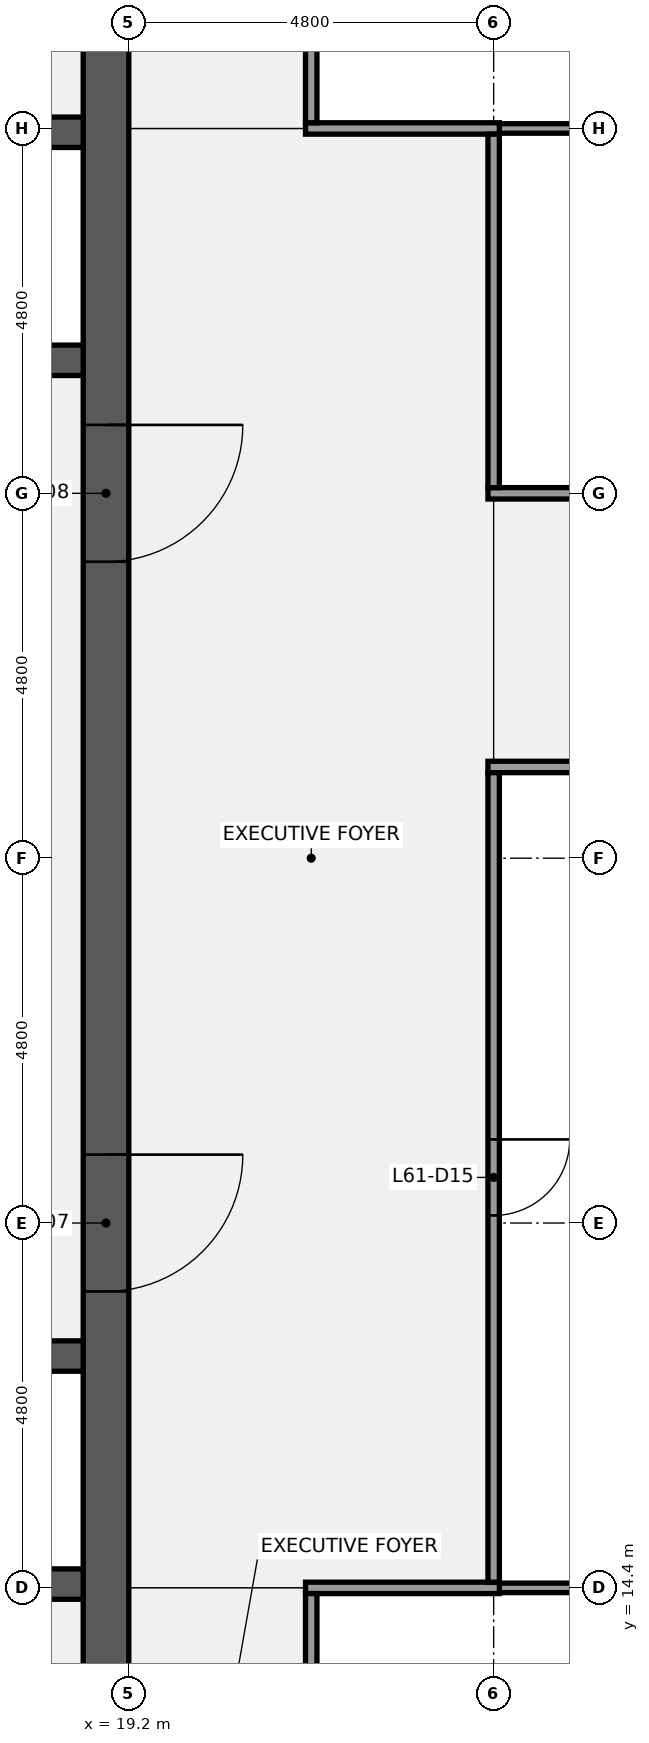
"""IFC4 building model, lengths in metres.
Left out: names, types, materials, properties, quantities, classifications, styles, units other than length and angle.
Written with IfcOpenShell. Run it as: python <this file> out.ifc"""

import sys

from ifc_helpers import new_model, si_unit, direction, frame, frame_2d, origin, place, context, subcontext, project, spatial, rectangle, extrude, element, fill, save


model = new_model("IFC4")
c1 = context("Model", 3, precision=1e-05, world=origin(), true_north=direction((0.0, 1.0)))
c2 = subcontext(c1, "Body", "Model", "MODEL_VIEW")
j1 = project(units=[si_unit("LENGTHUNIT", "METRE"), si_unit("PLANEANGLEUNIT", "RADIAN")], contexts=[c1])
p1 = place(None, origin())
s1 = spatial("IfcSite", under=j1, at=p1, CompositionType="ELEMENT")
p2 = place(p1, origin())
s2 = spatial("IfcBuilding", under=s1, at=p2, CompositionType="ELEMENT")
p3 = place(p2, frame((0.0, 0.0, 282.3)))
s3 = spatial("IfcBuildingStorey", under=s2, at=p3, CompositionType="ELEMENT", Elevation=282.3)
p4 = place(p3, frame((18.9, 38.4, 0.0), z_axis=(0.0, 0.0, 1.0), x_axis=(0.0, -1.0, 0.0)))
e1 = element("IfcWall", 1, at=p4, inside=s3, PredefinedType="SHEAR", context=c2, shape_type="SweptSolid", body=[
    extrude(rectangle(XDim=28.8, YDim=0.6, at=frame_2d((14.4, 0.0))), origin(), (0.0, 0.0, 1.0), 3.84),
])
p5 = place(p4, frame((18.3, 0.0, 0.0)))
e2 = element("IfcOpeningElement", 2, at=p5, cuts=e1, PredefinedType="OPENING", context=c2, shape_type="SweptSolid", body=[
    extrude(rectangle(XDim=1.8, YDim=2.1, at=frame_2d((0.9, 1.05))), frame((0.0, 0.31, 0.0), z_axis=(0.0, -1.0, 0.0), x_axis=(1.0, 0.0, 0.0)), (0.0, 0.0, 1.0), 0.62),
])
p6 = place(p4, frame((8.7, 0.0, 0.0)))
e3 = element("IfcOpeningElement", 3, at=p6, cuts=e1, PredefinedType="OPENING", context=c2, shape_type="SweptSolid", body=[
    extrude(rectangle(XDim=1.8, YDim=2.1, at=frame_2d((0.9, 1.05))), frame((0.0, 0.31, 0.0), z_axis=(0.0, -1.0, 0.0), x_axis=(1.0, 0.0, 0.0)), (0.0, 0.0, 1.0), 0.62),
])
p7 = place(p3, frame((0.6, 14.45, 0.0), z_axis=(0.0, 0.0, 1.0), x_axis=(1.0, 0.0, 0.0)))
e4 = element("IfcWall", 4, at=p7, inside=s3, PredefinedType="SHEAR", context=c2, shape_type="SweptSolid", body=[
    extrude(rectangle(XDim=18.0, YDim=0.4, at=frame_2d((9.0, 0.0))), origin(), (0.0, 0.0, 1.0), 3.84),
])
p8 = place(p3, frame((0.6, 17.45, 0.0), z_axis=(0.0, 0.0, 1.0), x_axis=(1.0, 0.0, 0.0)))
e5 = element("IfcWall", 5, at=p8, inside=s3, PredefinedType="SHEAR", context=c2, shape_type="SweptSolid", body=[
    extrude(rectangle(XDim=18.0, YDim=0.4, at=frame_2d((9.0, 0.0))), origin(), (0.0, 0.0, 1.0), 3.84),
])
p9 = place(p8, frame((1.863, 0.0, 0.0)))
e6 = element("IfcOpeningElement", 6, at=p9, cuts=e5, PredefinedType="OPENING", context=c2, shape_type="SweptSolid", body=[
    extrude(rectangle(XDim=1.0, YDim=2.1, at=frame_2d((0.5, 1.05))), frame((0.0, 0.21, 0.0), z_axis=(0.0, -1.0, 0.0), x_axis=(1.0, 0.0, 0.0)), (0.0, 0.0, 1.0), 0.42),
])
p10 = place(p8, frame((5.5, 0.0, 0.0)))
e7 = element("IfcOpeningElement", 7, at=p10, cuts=e5, PredefinedType="OPENING", context=c2, shape_type="SweptSolid", body=[
    extrude(rectangle(XDim=1.0, YDim=2.1, at=frame_2d((0.5, 1.05))), frame((0.0, 0.21, 0.0), z_axis=(0.0, -1.0, 0.0), x_axis=(1.0, 0.0, 0.0)), (0.0, 0.0, 1.0), 0.42),
])
p11 = place(p8, frame((9.7, 0.0, 0.0)))
e8 = element("IfcOpeningElement", 8, at=p11, cuts=e5, PredefinedType="OPENING", context=c2, shape_type="SweptSolid", body=[
    extrude(rectangle(XDim=1.0, YDim=2.1, at=frame_2d((0.5, 1.05))), frame((0.0, 0.21, 0.0), z_axis=(0.0, -1.0, 0.0), x_axis=(1.0, 0.0, 0.0)), (0.0, 0.0, 1.0), 0.42),
])
p12 = place(p8, frame((15.137, 0.0, 0.0)))
e9 = element("IfcOpeningElement", 9, at=p12, cuts=e5, PredefinedType="OPENING", context=c2, shape_type="SweptSolid", body=[
    extrude(rectangle(XDim=1.0, YDim=2.1, at=frame_2d((0.5, 1.05))), frame((0.0, 0.21, 0.0), z_axis=(0.0, -1.0, 0.0), x_axis=(1.0, 0.0, 0.0)), (0.0, 0.0, 1.0), 0.42),
])
p13 = place(p3, frame((0.6, 30.55, 0.0), z_axis=(0.0, 0.0, 1.0), x_axis=(1.0, 0.0, 0.0)))
e10 = element("IfcWall", 10, at=p13, inside=s3, PredefinedType="SHEAR", context=c2, shape_type="SweptSolid", body=[
    extrude(rectangle(XDim=18.0, YDim=0.4, at=frame_2d((9.0, 0.0))), origin(), (0.0, 0.0, 1.0), 3.84),
])
p14 = place(p13, frame((1.6, 0.0, 0.0)))
e11 = element("IfcOpeningElement", 11, at=p14, cuts=e10, PredefinedType="OPENING", context=c2, shape_type="SweptSolid", body=[
    extrude(rectangle(XDim=1.2, YDim=2.1, at=frame_2d((0.6, 1.05))), frame((0.0, 0.21, 0.0), z_axis=(0.0, -1.0, 0.0), x_axis=(1.0, 0.0, 0.0)), (0.0, 0.0, 1.0), 0.42),
])
p15 = place(p13, frame((4.2, 0.0, 0.0)))
e12 = element("IfcOpeningElement", 12, at=p15, cuts=e10, PredefinedType="OPENING", context=c2, shape_type="SweptSolid", body=[
    extrude(rectangle(XDim=1.2, YDim=2.1, at=frame_2d((0.6, 1.05))), frame((0.0, 0.21, 0.0), z_axis=(0.0, -1.0, 0.0), x_axis=(1.0, 0.0, 0.0)), (0.0, 0.0, 1.0), 0.42),
])
p16 = place(p13, frame((6.8, 0.0, 0.0)))
e13 = element("IfcOpeningElement", 13, at=p16, cuts=e10, PredefinedType="OPENING", context=c2, shape_type="SweptSolid", body=[
    extrude(rectangle(XDim=1.2, YDim=2.1, at=frame_2d((0.6, 1.05))), frame((0.0, 0.21, 0.0), z_axis=(0.0, -1.0, 0.0), x_axis=(1.0, 0.0, 0.0)), (0.0, 0.0, 1.0), 0.42),
])
p17 = place(p13, frame((10.0, 0.0, 0.0)))
e14 = element("IfcOpeningElement", 14, at=p17, cuts=e10, PredefinedType="OPENING", context=c2, shape_type="SweptSolid", body=[
    extrude(rectangle(XDim=1.2, YDim=2.1, at=frame_2d((0.6, 1.05))), frame((0.0, 0.21, 0.0), z_axis=(0.0, -1.0, 0.0), x_axis=(1.0, 0.0, 0.0)), (0.0, 0.0, 1.0), 0.42),
])
p18 = place(p13, frame((12.6, 0.0, 0.0)))
e15 = element("IfcOpeningElement", 15, at=p18, cuts=e10, PredefinedType="OPENING", context=c2, shape_type="SweptSolid", body=[
    extrude(rectangle(XDim=1.2, YDim=2.1, at=frame_2d((0.6, 1.05))), frame((0.0, 0.21, 0.0), z_axis=(0.0, -1.0, 0.0), x_axis=(1.0, 0.0, 0.0)), (0.0, 0.0, 1.0), 0.42),
])
p19 = place(p13, frame((15.2, 0.0, 0.0)))
e16 = element("IfcOpeningElement", 16, at=p19, cuts=e10, PredefinedType="OPENING", context=c2, shape_type="SweptSolid", body=[
    extrude(rectangle(XDim=1.2, YDim=2.1, at=frame_2d((0.6, 1.05))), frame((0.0, 0.21, 0.0), z_axis=(0.0, -1.0, 0.0), x_axis=(1.0, 0.0, 0.0)), (0.0, 0.0, 1.0), 0.42),
])
p20 = place(p3, frame((0.6, 33.55, 0.0), z_axis=(0.0, 0.0, 1.0), x_axis=(1.0, 0.0, 0.0)))
e17 = element("IfcWall", 17, at=p20, inside=s3, PredefinedType="SHEAR", context=c2, shape_type="SweptSolid", body=[
    extrude(rectangle(XDim=18.0, YDim=0.4, at=frame_2d((9.0, 0.0))), origin(), (0.0, 0.0, 1.0), 3.84),
])
p21 = place(p3, frame((24.075, 14.4, 0.0), z_axis=(0.0, 0.0, 1.0), x_axis=(1.0, 0.0, 0.0)))
e18 = element("IfcWall", 18, at=p21, inside=s3, PredefinedType="PARTITIONING", context=c2, shape_type="SweptSolid", body=[
    extrude(rectangle(XDim=9.6, YDim=0.125, at=frame_2d((4.8, 0.0))), origin(), (0.0, 0.0, 1.0), 2.87),
])
p22 = place(p3, frame((21.525, 14.4, 0.0), z_axis=(0.0, 0.0, 1.0), x_axis=(1.0, 0.0, 0.0)))
e19 = element("IfcWall", 19, at=p22, inside=s3, PredefinedType="PARTITIONING", context=c2, shape_type="SweptSolid", body=[
    extrude(rectangle(XDim=2.55, YDim=0.15, at=frame_2d((1.275, 0.0))), origin(), (0.0, 0.0, 1.0), 2.87),
])
p23 = place(p3, frame((23.925, 25.2, 0.0), z_axis=(0.0, 0.0, 1.0), x_axis=(1.0, 0.0, 0.0)))
e20 = element("IfcWall", 20, at=p23, inside=s3, PredefinedType="PARTITIONING", context=c2, shape_type="SweptSolid", body=[
    extrude(rectangle(XDim=9.75, YDim=0.15, at=frame_2d((4.875, 0.0))), origin(), (0.0, 0.0, 1.0), 2.87),
])
p24 = place(p3, frame((23.925, 28.8, 0.0), z_axis=(0.0, 0.0, 1.0), x_axis=(1.0, 0.0, 0.0)))
e21 = element("IfcWall", 21, at=p24, inside=s3, PredefinedType="PARTITIONING", context=c2, shape_type="SweptSolid", body=[
    extrude(rectangle(XDim=9.75, YDim=0.15, at=frame_2d((4.875, 0.0))), origin(), (0.0, 0.0, 1.0), 2.87),
])
p25 = place(p24, frame((4.375, 0.0, 0.0)))
e22 = element("IfcOpeningElement", 22, at=p25, cuts=e21, PredefinedType="OPENING", context=c2, shape_type="SweptSolid", body=[
    extrude(rectangle(XDim=1.0, YDim=2.1, at=frame_2d((0.5, 1.05))), frame((0.0, 0.085, 0.0), z_axis=(0.0, -1.0, 0.0), x_axis=(1.0, 0.0, 0.0)), (0.0, 0.0, 1.0), 0.17),
])
p26 = place(p3, frame((24.075, 33.6, 0.0), z_axis=(0.0, 0.0, 1.0), x_axis=(1.0, 0.0, 0.0)))
e23 = element("IfcWall", 23, at=p26, inside=s3, PredefinedType="PARTITIONING", context=c2, shape_type="SweptSolid", body=[
    extrude(rectangle(XDim=9.6, YDim=0.125, at=frame_2d((4.8, 0.0))), origin(), (0.0, 0.0, 1.0), 2.87),
])
p27 = place(p3, frame((21.525, 33.6, 0.0), z_axis=(0.0, 0.0, 1.0), x_axis=(1.0, 0.0, 0.0)))
e24 = element("IfcWall", 24, at=p27, inside=s3, PredefinedType="PARTITIONING", context=c2, shape_type="SweptSolid", body=[
    extrude(rectangle(XDim=2.55, YDim=0.15, at=frame_2d((1.275, 0.0))), origin(), (0.0, 0.0, 1.0), 2.87),
])
p28 = place(p3, frame((21.6, 9.675, 0.0), z_axis=(0.0, 0.0, 1.0), x_axis=(0.0, 1.0, 0.0)))
e25 = element("IfcWall", 25, at=p28, inside=s3, PredefinedType="PARTITIONING", context=c2, shape_type="SweptSolid", body=[
    extrude(rectangle(XDim=4.65, YDim=0.15, at=frame_2d((2.325, 0.0))), origin(), (0.0, 0.0, 1.0), 2.87),
])
p29 = place(p28, frame((1.825, 0.0, 0.0)))
e26 = element("IfcOpeningElement", 26, at=p29, cuts=e25, PredefinedType="OPENING", context=c2, shape_type="SweptSolid", body=[
    extrude(rectangle(XDim=1.0, YDim=2.1, at=frame_2d((0.5, 1.05))), frame((0.0, 0.085, 0.0), z_axis=(0.0, -1.0, 0.0), x_axis=(1.0, 0.0, 0.0)), (0.0, 0.0, 1.0), 0.17),
])
p30 = place(p3, frame((21.6, 33.675, 0.0), z_axis=(0.0, 0.0, 1.0), x_axis=(0.0, 1.0, 0.0)))
e27 = element("IfcWall", 27, at=p30, inside=s3, PredefinedType="PARTITIONING", context=c2, shape_type="SweptSolid", body=[
    extrude(rectangle(XDim=4.65, YDim=0.15, at=frame_2d((2.325, 0.0))), origin(), (0.0, 0.0, 1.0), 2.87),
])
p31 = place(p3, frame((24.0, 14.475, 0.0), z_axis=(0.0, 0.0, 1.0), x_axis=(0.0, 1.0, 0.0)))
e28 = element("IfcWall", 28, at=p31, inside=s3, PredefinedType="PARTITIONING", context=c2, shape_type="SweptSolid", body=[
    extrude(rectangle(XDim=10.65, YDim=0.15, at=frame_2d((5.325, 0.0))), origin(), (0.0, 0.0, 1.0), 2.87),
])
p32 = place(p31, frame((4.825, 0.0, 0.0)))
e29 = element("IfcOpeningElement", 29, at=p32, cuts=e28, PredefinedType="OPENING", context=c2, shape_type="SweptSolid", body=[
    extrude(rectangle(XDim=1.0, YDim=2.1, at=frame_2d((0.5, 1.05))), frame((0.0, 0.085, 0.0), z_axis=(0.0, -1.0, 0.0), x_axis=(1.0, 0.0, 0.0)), (0.0, 0.0, 1.0), 0.17),
])
p33 = place(p3, frame((24.0, 28.875, 0.0), z_axis=(0.0, 0.0, 1.0), x_axis=(0.0, 1.0, 0.0)))
e30 = element("IfcWall", 30, at=p33, inside=s3, PredefinedType="PARTITIONING", context=c2, shape_type="SweptSolid", body=[
    extrude(rectangle(XDim=4.65, YDim=0.15, at=frame_2d((2.325, 0.0))), origin(), (0.0, 0.0, 1.0), 2.87),
])
p34 = place(p5, origin())
e31 = element("IfcDoor", 31, at=p34, inside=s3, OperationType="DOUBLE_DOOR_SINGLE_SWING", PredefinedType="DOOR", context=c2, shape_type="SweptSolid", body=[
    extrude(rectangle(XDim=1.8, YDim=2.1, at=frame_2d((0.9, 1.05))), frame((0.0, 0.025, 0.0), z_axis=(0.0, -1.0, 0.0), x_axis=(1.0, 0.0, 0.0)), (0.0, 0.0, 1.0), 0.05),
])
fill(e2, e31)
p35 = place(p6, origin())
e32 = element("IfcDoor", 32, at=p35, inside=s3, OperationType="DOUBLE_DOOR_SINGLE_SWING", PredefinedType="DOOR", context=c2, shape_type="SweptSolid", body=[
    extrude(rectangle(XDim=1.8, YDim=2.1, at=frame_2d((0.9, 1.05))), frame((0.0, 0.025, 0.0), z_axis=(0.0, -1.0, 0.0), x_axis=(1.0, 0.0, 0.0)), (0.0, 0.0, 1.0), 0.05),
])
fill(e3, e32)
p36 = place(p32, origin())
e33 = element("IfcDoor", 33, at=p36, inside=s3, OperationType="SINGLE_SWING_RIGHT", PredefinedType="DOOR", context=c2, shape_type="SweptSolid", body=[
    extrude(rectangle(XDim=1.0, YDim=2.1, at=frame_2d((0.5, 1.05))), frame((0.0, 0.025, 0.0), z_axis=(0.0, -1.0, 0.0), x_axis=(1.0, 0.0, 0.0)), (0.0, 0.0, 1.0), 0.05),
])
fill(e29, e33)
save(model, sys.argv[1])
